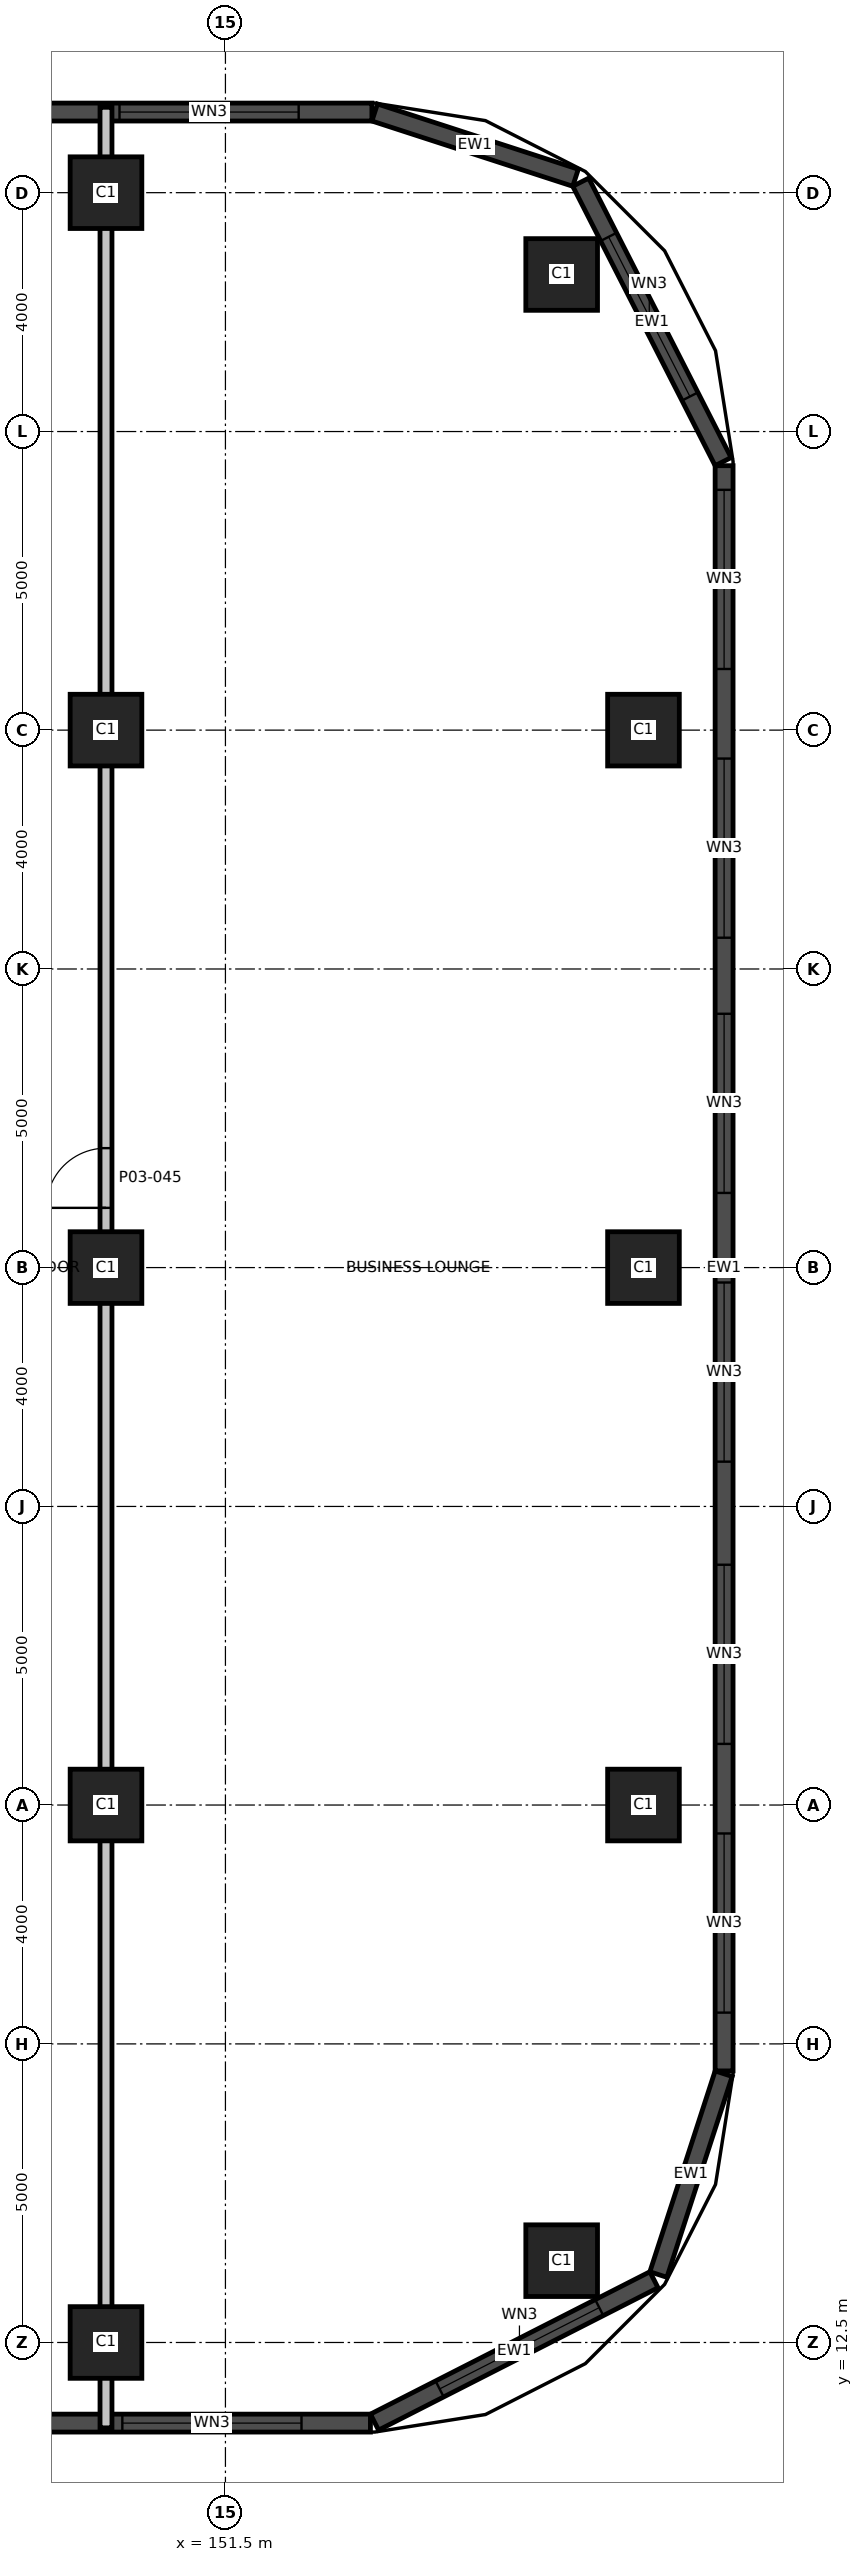
"""IFC4 building model, lengths in metres.
Left out: names, types, materials, properties, quantities, classifications, styles, units other than length and angle.
Written with IfcOpenShell. Run it as: python <this file> out.ifc"""

import sys

from ifc_helpers import new_model, si_unit, direction, frame, frame_2d, origin, origin_2d, place, context, subcontext, project, spatial, rectangle, extrude, element, fill, save


model = new_model("IFC4")
c1 = context("Model", 3, precision=1e-05, world=origin(), true_north=direction((0.0, 1.0)))
c2 = subcontext(c1, "Body", "Model", "MODEL_VIEW")
j1 = project(units=[si_unit("LENGTHUNIT", "METRE"), si_unit("PLANEANGLEUNIT", "RADIAN")], contexts=[c1])
p1 = place(None, origin())
s1 = spatial("IfcSite", under=j1, at=p1, CompositionType="ELEMENT")
p2 = place(p1, origin())
s2 = spatial("IfcBuilding", under=s1, at=p2, CompositionType="ELEMENT")
p3 = place(p2, frame((0.0, 0.0, 18.5)))
s3 = spatial("IfcBuildingStorey", under=s2, at=p3, CompositionType="ELEMENT", Elevation=18.5)
for number, where, z_axis, x_axis in (
    (1, (149.5, 12.5, 0.0), (0.0, 0.0, 1.0), (1.0, 0.0, 0.0)),
    (2, (157.13, 13.87, 0.0), (0.0, 0.0, 1.0), (1.0, 0.0, 0.0)),
    (3, (149.5, 21.5, 0.0), (0.0, 0.0, 1.0), (1.0, 0.0, 0.0)),
    (4, (158.5, 21.5, 0.0), (0.0, 0.0, 1.0), (1.0, 0.0, 0.0)),
    (5, (149.5, 30.5, 0.0), (0.0, 0.0, 1.0), (1.0, 0.0, 0.0)),
    (6, (158.5, 30.5, 0.0), (0.0, 0.0, 1.0), (1.0, 0.0, 0.0)),
    (7, (149.5, 39.5, 0.0), (0.0, 0.0, 1.0), (1.0, 0.0, 0.0)),
    (8, (158.5, 39.5, 0.0), (0.0, 0.0, 1.0), (1.0, 0.0, 0.0)),
    (9, (157.13, 47.13, 0.0), (0.0, 0.0, 1.0), (1.0, 0.0, 0.0)),
    (10, (149.5, 48.5, 0.0), (0.0, 0.0, 1.0), (1.0, 0.0, 0.0)),
):
    element("IfcColumn", number, at=place(p3, frame(where, z_axis=z_axis, x_axis=x_axis)), inside=s3, PredefinedType="COLUMN", context=c2, shape_type="SweptSolid", body=[
        extrude(rectangle(XDim=1.2, YDim=1.2, at=origin_2d()), origin(), (0.0, 0.0, 1.0), 5.0),
    ])
p4 = place(p3, frame((118.048, 11.15, 0.0), z_axis=(0.0, 0.0, 1.0), x_axis=(1.0, 0.0, 0.0)))
e11 = element("IfcWall", 11, at=p4, inside=s3, PredefinedType="SOLIDWALL", context=c2, shape_type="SweptSolid", body=[
    extrude(rectangle(XDim=35.88, YDim=0.3, at=frame_2d((17.94, 0.0))), origin(), (0.0, 0.0, 1.0), 4.7),
])
p5 = place(p4, frame((4.202, 0.0, 0.9)))
e12 = element("IfcOpeningElement", 12, at=p5, cuts=e11, PredefinedType="OPENING", context=c2, shape_type="SweptSolid", body=[
    extrude(rectangle(XDim=3.0, YDim=2.4, at=frame_2d((1.5, 1.2))), frame((0.0, 0.16, 0.0), z_axis=(0.0, -1.0, 0.0), x_axis=(1.0, 0.0, 0.0)), (0.0, 0.0, 1.0), 0.32),
])
p6 = place(p4, frame((8.702, 0.0, 0.9)))
e13 = element("IfcOpeningElement", 13, at=p6, cuts=e11, PredefinedType="OPENING", context=c2, shape_type="SweptSolid", body=[
    extrude(rectangle(XDim=3.0, YDim=2.4, at=frame_2d((1.5, 1.2))), frame((0.0, 0.16, 0.0), z_axis=(0.0, -1.0, 0.0), x_axis=(1.0, 0.0, 0.0)), (0.0, 0.0, 1.0), 0.32),
])
p7 = place(p4, frame((13.202, 0.0, 0.9)))
e14 = element("IfcOpeningElement", 14, at=p7, cuts=e11, PredefinedType="OPENING", context=c2, shape_type="SweptSolid", body=[
    extrude(rectangle(XDim=3.0, YDim=2.4, at=frame_2d((1.5, 1.2))), frame((0.0, 0.16, 0.0), z_axis=(0.0, -1.0, 0.0), x_axis=(1.0, 0.0, 0.0)), (0.0, 0.0, 1.0), 0.32),
])
p8 = place(p4, frame((17.702, 0.0, 0.9)))
e15 = element("IfcOpeningElement", 15, at=p8, cuts=e11, PredefinedType="OPENING", context=c2, shape_type="SweptSolid", body=[
    extrude(rectangle(XDim=3.0, YDim=2.4, at=frame_2d((1.5, 1.2))), frame((0.0, 0.16, 0.0), z_axis=(0.0, -1.0, 0.0), x_axis=(1.0, 0.0, 0.0)), (0.0, 0.0, 1.0), 0.32),
])
p9 = place(p4, frame((22.202, 0.0, 0.9)))
e16 = element("IfcOpeningElement", 16, at=p9, cuts=e11, PredefinedType="OPENING", context=c2, shape_type="SweptSolid", body=[
    extrude(rectangle(XDim=3.0, YDim=2.4, at=frame_2d((1.5, 1.2))), frame((0.0, 0.16, 0.0), z_axis=(0.0, -1.0, 0.0), x_axis=(1.0, 0.0, 0.0)), (0.0, 0.0, 1.0), 0.32),
])
p10 = place(p4, frame((31.726, 0.0, 0.9)))
e17 = element("IfcOpeningElement", 17, at=p10, cuts=e11, PredefinedType="OPENING", context=c2, shape_type="SweptSolid", body=[
    extrude(rectangle(XDim=3.0, YDim=2.4, at=frame_2d((1.5, 1.2))), frame((0.0, 0.16, 0.0), z_axis=(0.0, -1.0, 0.0), x_axis=(1.0, 0.0, 0.0)), (0.0, 0.0, 1.0), 0.32),
])
p11 = place(p3, frame((153.996, 11.166, 0.0), z_axis=(0.0, 0.0, 1.0), x_axis=(0.890998339455, 0.454006562826, 0.0)))
e18 = element("IfcWall", 18, at=p11, inside=s3, PredefinedType="SOLIDWALL", context=c2, shape_type="SweptSolid", body=[
    extrude(rectangle(XDim=5.252, YDim=0.3, at=frame_2d((2.626, 0.0))), origin(), (0.0, 0.0, 1.0), 4.7),
])
p12 = place(p11, frame((1.224, 0.0, 0.9)))
e19 = element("IfcOpeningElement", 19, at=p12, cuts=e18, PredefinedType="OPENING", context=c2, shape_type="SweptSolid", body=[
    extrude(rectangle(XDim=3.0, YDim=2.4, at=frame_2d((1.5, 1.2))), frame((0.0, 0.16, 0.0), z_axis=(0.0, -1.0, 0.0), x_axis=(1.0, 0.0, 0.0)), (0.0, 0.0, 1.0), 0.32),
])
p13 = place(p3, frame((158.75, 13.638, 0.0), z_axis=(0.0, 0.0, 1.0), x_axis=(0.309073584194, 0.951038127287, 0.0)))
e20 = element("IfcWall", 20, at=p13, inside=s3, PredefinedType="SOLIDWALL", context=c2, shape_type="SweptSolid", body=[
    extrude(rectangle(XDim=3.536, YDim=0.3, at=frame_2d((1.768, 0.0))), origin(), (0.0, 0.0, 1.0), 4.7),
])
p14 = place(p3, frame((159.85, 17.048, 0.0), z_axis=(0.0, 0.0, 1.0), x_axis=(0.0, 1.0, 0.0)))
e21 = element("IfcWall", 21, at=p14, inside=s3, PredefinedType="SOLIDWALL", context=c2, shape_type="SweptSolid", body=[
    extrude(rectangle(XDim=26.88, YDim=0.3, at=frame_2d((13.44, 0.0))), origin(), (0.0, 0.0, 1.0), 4.7),
])
p15 = place(p14, frame((0.976, 0.0, 0.9)))
e22 = element("IfcOpeningElement", 22, at=p15, cuts=e21, PredefinedType="OPENING", context=c2, shape_type="SweptSolid", body=[
    extrude(rectangle(XDim=3.0, YDim=2.4, at=frame_2d((1.5, 1.2))), frame((0.0, 0.16, 0.0), z_axis=(0.0, -1.0, 0.0), x_axis=(1.0, 0.0, 0.0)), (0.0, 0.0, 1.0), 0.32),
])
p16 = place(p14, frame((5.476, 0.0, 0.9)))
e23 = element("IfcOpeningElement", 23, at=p16, cuts=e21, PredefinedType="OPENING", context=c2, shape_type="SweptSolid", body=[
    extrude(rectangle(XDim=3.0, YDim=2.4, at=frame_2d((1.5, 1.2))), frame((0.0, 0.16, 0.0), z_axis=(0.0, -1.0, 0.0), x_axis=(1.0, 0.0, 0.0)), (0.0, 0.0, 1.0), 0.32),
])
p17 = place(p14, frame((10.202, 0.0, 0.9)))
e24 = element("IfcOpeningElement", 24, at=p17, cuts=e21, PredefinedType="OPENING", context=c2, shape_type="SweptSolid", body=[
    extrude(rectangle(XDim=3.0, YDim=2.4, at=frame_2d((1.5, 1.2))), frame((0.0, 0.16, 0.0), z_axis=(0.0, -1.0, 0.0), x_axis=(1.0, 0.0, 0.0)), (0.0, 0.0, 1.0), 0.32),
])
p18 = place(p14, frame((14.702, 0.0, 0.9)))
e25 = element("IfcOpeningElement", 25, at=p18, cuts=e21, PredefinedType="OPENING", context=c2, shape_type="SweptSolid", body=[
    extrude(rectangle(XDim=3.0, YDim=2.4, at=frame_2d((1.5, 1.2))), frame((0.0, 0.16, 0.0), z_axis=(0.0, -1.0, 0.0), x_axis=(1.0, 0.0, 0.0)), (0.0, 0.0, 1.0), 0.32),
])
p19 = place(p14, frame((18.976, 0.0, 0.9)))
e26 = element("IfcOpeningElement", 26, at=p19, cuts=e21, PredefinedType="OPENING", context=c2, shape_type="SweptSolid", body=[
    extrude(rectangle(XDim=3.0, YDim=2.4, at=frame_2d((1.5, 1.2))), frame((0.0, 0.16, 0.0), z_axis=(0.0, -1.0, 0.0), x_axis=(1.0, 0.0, 0.0)), (0.0, 0.0, 1.0), 0.32),
])
p20 = place(p14, frame((23.476, 0.0, 0.9)))
e27 = element("IfcOpeningElement", 27, at=p20, cuts=e21, PredefinedType="OPENING", context=c2, shape_type="SweptSolid", body=[
    extrude(rectangle(XDim=3.0, YDim=2.4, at=frame_2d((1.5, 1.2))), frame((0.0, 0.16, 0.0), z_axis=(0.0, -1.0, 0.0), x_axis=(1.0, 0.0, 0.0)), (0.0, 0.0, 1.0), 0.32),
])
p21 = place(p3, frame((159.834, 43.996, 0.0), z_axis=(0.0, 0.0, 1.0), x_axis=(-0.454006562826, 0.890998339455, 0.0)))
e28 = element("IfcWall", 28, at=p21, inside=s3, PredefinedType="SOLIDWALL", context=c2, shape_type="SweptSolid", body=[
    extrude(rectangle(XDim=5.252, YDim=0.3, at=frame_2d((2.626, 0.0))), origin(), (0.0, 0.0, 1.0), 4.7),
])
p22 = place(p21, frame((1.224, 0.0, 0.9)))
e29 = element("IfcOpeningElement", 29, at=p22, cuts=e28, PredefinedType="OPENING", context=c2, shape_type="SweptSolid", body=[
    extrude(rectangle(XDim=3.0, YDim=2.4, at=frame_2d((1.5, 1.2))), frame((0.0, 0.16, 0.0), z_axis=(0.0, -1.0, 0.0), x_axis=(1.0, 0.0, 0.0)), (0.0, 0.0, 1.0), 0.32),
])
p23 = place(p3, frame((157.362, 48.75, 0.0), z_axis=(0.0, 0.0, 1.0), x_axis=(-0.951038127287, 0.309073584194, 0.0)))
e30 = element("IfcWall", 30, at=p23, inside=s3, PredefinedType="SOLIDWALL", context=c2, shape_type="SweptSolid", body=[
    extrude(rectangle(XDim=3.536, YDim=0.3, at=frame_2d((1.768, 0.0))), origin(), (0.0, 0.0, 1.0), 4.7),
])
p24 = place(p3, frame((153.952, 49.85, 0.0), z_axis=(0.0, 0.0, 1.0), x_axis=(-1.0, 0.0, 0.0)))
e31 = element("IfcWall", 31, at=p24, inside=s3, PredefinedType="SOLIDWALL", context=c2, shape_type="SweptSolid", body=[
    extrude(rectangle(XDim=35.88, YDim=0.3, at=frame_2d((17.94, 0.0))), origin(), (0.0, 0.0, 1.0), 4.7),
])
p25 = place(p24, frame((1.226, 0.0, 0.9)))
e32 = element("IfcOpeningElement", 32, at=p25, cuts=e31, PredefinedType="OPENING", context=c2, shape_type="SweptSolid", body=[
    extrude(rectangle(XDim=3.0, YDim=2.4, at=frame_2d((1.5, 1.2))), frame((0.0, 0.16, 0.0), z_axis=(0.0, -1.0, 0.0), x_axis=(1.0, 0.0, 0.0)), (0.0, 0.0, 1.0), 0.32),
])
p26 = place(p24, frame((15.202, 0.0, 0.9)))
e33 = element("IfcOpeningElement", 33, at=p26, cuts=e31, PredefinedType="OPENING", context=c2, shape_type="SweptSolid", body=[
    extrude(rectangle(XDim=3.0, YDim=2.4, at=frame_2d((1.5, 1.2))), frame((0.0, 0.16, 0.0), z_axis=(0.0, -1.0, 0.0), x_axis=(1.0, 0.0, 0.0)), (0.0, 0.0, 1.0), 0.32),
])
p27 = place(p24, frame((24.202, 0.0, 0.9)))
e34 = element("IfcOpeningElement", 34, at=p27, cuts=e31, PredefinedType="OPENING", context=c2, shape_type="SweptSolid", body=[
    extrude(rectangle(XDim=3.0, YDim=2.4, at=frame_2d((1.5, 1.2))), frame((0.0, 0.16, 0.0), z_axis=(0.0, -1.0, 0.0), x_axis=(1.0, 0.0, 0.0)), (0.0, 0.0, 1.0), 0.32),
])
p28 = place(p24, frame((28.702, 0.0, 0.9)))
e35 = element("IfcOpeningElement", 35, at=p28, cuts=e31, PredefinedType="OPENING", context=c2, shape_type="SweptSolid", body=[
    extrude(rectangle(XDim=3.0, YDim=2.4, at=frame_2d((1.5, 1.2))), frame((0.0, 0.16, 0.0), z_axis=(0.0, -1.0, 0.0), x_axis=(1.0, 0.0, 0.0)), (0.0, 0.0, 1.0), 0.32),
])
p29 = place(p3, frame((149.5, 11.07, 0.0), z_axis=(0.0, 0.0, 1.0), x_axis=(0.0, 1.0, 0.0)))
e36 = element("IfcWall", 36, at=p29, inside=s3, PredefinedType="PARTITIONING", context=c2, shape_type="SweptSolid", body=[
    extrude(rectangle(XDim=38.86, YDim=0.2, at=frame_2d((19.43, 0.0))), origin(), (0.0, 0.0, 1.0), 4.7),
])
p30 = place(p29, frame((20.43, 0.0, 0.0)))
e37 = element("IfcOpeningElement", 37, at=p30, cuts=e36, PredefinedType="OPENING", context=c2, shape_type="SweptSolid", body=[
    extrude(rectangle(XDim=1.0, YDim=2.1, at=frame_2d((0.5, 1.05))), frame((0.0, 0.11, 0.0), z_axis=(0.0, -1.0, 0.0), x_axis=(1.0, 0.0, 0.0)), (0.0, 0.0, 1.0), 0.22),
])
p31 = place(p10, origin())
e38 = element("IfcWindow", 38, at=p31, inside=s3, PartitioningType="SINGLE_PANEL", PredefinedType="WINDOW", context=c2, shape_type="SweptSolid", body=[
    extrude(rectangle(XDim=3.0, YDim=2.4, at=frame_2d((1.5, 1.2))), frame((0.0, 0.03, 0.0), z_axis=(0.0, -1.0, 0.0), x_axis=(1.0, 0.0, 0.0)), (0.0, 0.0, 1.0), 0.06),
])
fill(e17, e38)
p32 = place(p12, origin())
e39 = element("IfcWindow", 39, at=p32, inside=s3, PartitioningType="SINGLE_PANEL", PredefinedType="WINDOW", context=c2, shape_type="SweptSolid", body=[
    extrude(rectangle(XDim=3.0, YDim=2.4, at=frame_2d((1.5, 1.2))), frame((0.0, 0.03, 0.0), z_axis=(0.0, -1.0, 0.0), x_axis=(1.0, 0.0, 0.0)), (0.0, 0.0, 1.0), 0.06),
])
fill(e19, e39)
p33 = place(p15, origin())
e40 = element("IfcWindow", 40, at=p33, inside=s3, PartitioningType="SINGLE_PANEL", PredefinedType="WINDOW", context=c2, shape_type="SweptSolid", body=[
    extrude(rectangle(XDim=3.0, YDim=2.4, at=frame_2d((1.5, 1.2))), frame((0.0, 0.03, 0.0), z_axis=(0.0, -1.0, 0.0), x_axis=(1.0, 0.0, 0.0)), (0.0, 0.0, 1.0), 0.06),
])
fill(e22, e40)
p34 = place(p16, origin())
e41 = element("IfcWindow", 41, at=p34, inside=s3, PartitioningType="SINGLE_PANEL", PredefinedType="WINDOW", context=c2, shape_type="SweptSolid", body=[
    extrude(rectangle(XDim=3.0, YDim=2.4, at=frame_2d((1.5, 1.2))), frame((0.0, 0.03, 0.0), z_axis=(0.0, -1.0, 0.0), x_axis=(1.0, 0.0, 0.0)), (0.0, 0.0, 1.0), 0.06),
])
fill(e23, e41)
p35 = place(p17, origin())
e42 = element("IfcWindow", 42, at=p35, inside=s3, PartitioningType="SINGLE_PANEL", PredefinedType="WINDOW", context=c2, shape_type="SweptSolid", body=[
    extrude(rectangle(XDim=3.0, YDim=2.4, at=frame_2d((1.5, 1.2))), frame((0.0, 0.03, 0.0), z_axis=(0.0, -1.0, 0.0), x_axis=(1.0, 0.0, 0.0)), (0.0, 0.0, 1.0), 0.06),
])
fill(e24, e42)
p36 = place(p18, origin())
e43 = element("IfcWindow", 43, at=p36, inside=s3, PartitioningType="SINGLE_PANEL", PredefinedType="WINDOW", context=c2, shape_type="SweptSolid", body=[
    extrude(rectangle(XDim=3.0, YDim=2.4, at=frame_2d((1.5, 1.2))), frame((0.0, 0.03, 0.0), z_axis=(0.0, -1.0, 0.0), x_axis=(1.0, 0.0, 0.0)), (0.0, 0.0, 1.0), 0.06),
])
fill(e25, e43)
p37 = place(p19, origin())
e44 = element("IfcWindow", 44, at=p37, inside=s3, PartitioningType="SINGLE_PANEL", PredefinedType="WINDOW", context=c2, shape_type="SweptSolid", body=[
    extrude(rectangle(XDim=3.0, YDim=2.4, at=frame_2d((1.5, 1.2))), frame((0.0, 0.03, 0.0), z_axis=(0.0, -1.0, 0.0), x_axis=(1.0, 0.0, 0.0)), (0.0, 0.0, 1.0), 0.06),
])
fill(e26, e44)
p38 = place(p20, origin())
e45 = element("IfcWindow", 45, at=p38, inside=s3, PartitioningType="SINGLE_PANEL", PredefinedType="WINDOW", context=c2, shape_type="SweptSolid", body=[
    extrude(rectangle(XDim=3.0, YDim=2.4, at=frame_2d((1.5, 1.2))), frame((0.0, 0.03, 0.0), z_axis=(0.0, -1.0, 0.0), x_axis=(1.0, 0.0, 0.0)), (0.0, 0.0, 1.0), 0.06),
])
fill(e27, e45)
p39 = place(p22, origin())
e46 = element("IfcWindow", 46, at=p39, inside=s3, PartitioningType="SINGLE_PANEL", PredefinedType="WINDOW", context=c2, shape_type="SweptSolid", body=[
    extrude(rectangle(XDim=3.0, YDim=2.4, at=frame_2d((1.5, 1.2))), frame((0.0, 0.03, 0.0), z_axis=(0.0, -1.0, 0.0), x_axis=(1.0, 0.0, 0.0)), (0.0, 0.0, 1.0), 0.06),
])
fill(e29, e46)
p40 = place(p25, origin())
e47 = element("IfcWindow", 47, at=p40, inside=s3, PartitioningType="SINGLE_PANEL", PredefinedType="WINDOW", context=c2, shape_type="SweptSolid", body=[
    extrude(rectangle(XDim=3.0, YDim=2.4, at=frame_2d((1.5, 1.2))), frame((0.0, 0.03, 0.0), z_axis=(0.0, -1.0, 0.0), x_axis=(1.0, 0.0, 0.0)), (0.0, 0.0, 1.0), 0.06),
])
fill(e32, e47)
p41 = place(p30, origin())
e48 = element("IfcDoor", 48, at=p41, inside=s3, OperationType="SINGLE_SWING_LEFT", PredefinedType="DOOR", context=c2, shape_type="SweptSolid", body=[
    extrude(rectangle(XDim=1.0, YDim=2.1, at=frame_2d((0.5, 1.05))), frame((0.0, 0.025, 0.0), z_axis=(0.0, -1.0, 0.0), x_axis=(1.0, 0.0, 0.0)), (0.0, 0.0, 1.0), 0.05),
])
fill(e37, e48)
save(model, sys.argv[1])
